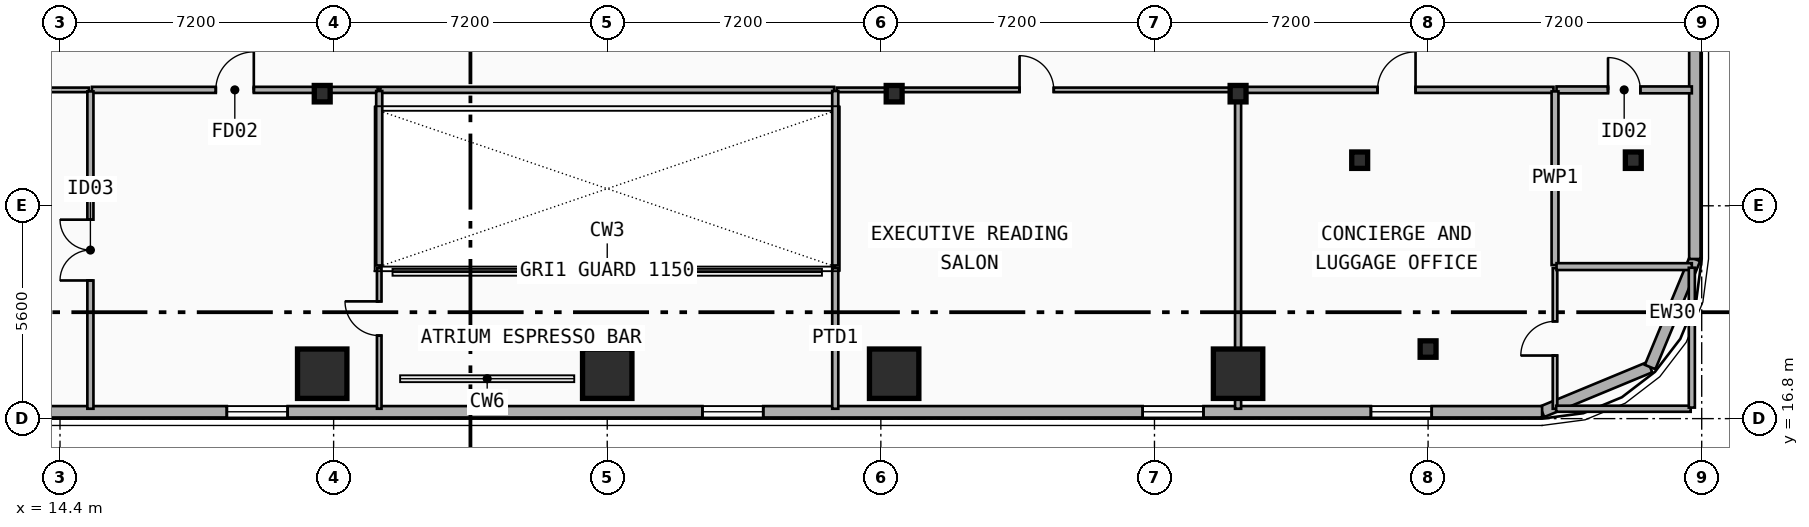
"""IFC4 building model, lengths in metres.
Left out: names, types, materials, properties, quantities, classifications, styles, units other than length and angle.
Written with IfcOpenShell. Run it as: python <this file> out.ifc"""

import sys

from ifc_helpers import new_model, si_unit, direction, frame, frame_2d, origin, origin_2d, place, context, subcontext, project, spatial, rectangle, i_section, extrude, element, fill, save


model = new_model("IFC4")
c1 = context("Model", 3, precision=1e-05, world=origin(), true_north=direction((0.0, 1.0)))
c2 = subcontext(c1, "Body", "Model", "MODEL_VIEW")
j1 = project(units=[si_unit("LENGTHUNIT", "METRE"), si_unit("PLANEANGLEUNIT", "RADIAN")], contexts=[c1])
p1 = place(None, origin())
s1 = spatial("IfcSite", under=j1, at=p1, CompositionType="ELEMENT")
p2 = place(p1, origin())
s2 = spatial("IfcBuilding", under=s1, at=p2, CompositionType="ELEMENT")
p3 = place(p2, frame((0.0, 0.0, 89.8)))
s3 = spatial("IfcBuildingStorey", under=s2, at=p3, CompositionType="ELEMENT", Elevation=89.8)
for number, where, z_axis, x_axis in (
    (1, (21.3, 25.35, 0.0), (0.0, 0.0, 1.0), (1.0, 0.0, 0.0)),
    (2, (36.35, 25.35, 0.0), (0.0, 0.0, 1.0), (1.0, 0.0, 0.0)),
    (3, (45.4, 25.35, 0.0), (0.0, 0.0, 1.0), (1.0, 0.0, 0.0)),
):
    element("IfcColumn", number, at=place(p3, frame(where, z_axis=z_axis, x_axis=x_axis)), inside=s3, PredefinedType="COLUMN", context=c2, shape_type="SweptSolid", body=[
        extrude(i_section(OverallWidth=0.418, OverallDepth=0.432, WebThickness=0.035, FlangeThickness=0.056, FilletRadius=0.015, at=origin_2d()), origin(), (0.0, 0.0, 1.0), 4.5),
    ])
for number, where, z_axis, x_axis in (
    (4, (21.3, 18.09, 0.0), (0.0, -0.09, 0.996), (1.0, 0.0, 0.0)),
    (5, (28.8, 18.09, 0.0), (0.0, -0.09, 0.996), (1.0, 0.0, 0.0)),
    (6, (36.35, 18.09, 0.0), (0.0, -0.09, 0.996), (1.0, 0.0, 0.0)),
    (7, (45.4, 18.09, 0.0), (0.0, -0.09, 0.996), (1.0, 0.0, 0.0)),
):
    element("IfcColumn", number, at=place(p3, frame(where, z_axis=z_axis, x_axis=x_axis)), inside=s3, PredefinedType="COLUMN", context=c2, shape_type="SweptSolid", body=[
        extrude(rectangle(XDim=1.3, YDim=1.3, at=origin_2d()), origin(), (0.0, 0.0, 1.0), 4.518),
    ])
p4 = place(p3, frame((48.6, 23.6, 0.0), z_axis=(0.0, 0.0, 1.0), x_axis=(1.0, 0.0, 0.0)))
e8 = element("IfcColumn", 8, at=p4, inside=s3, PredefinedType="COLUMN", context=c2, shape_type="SweptSolid", body=[
    extrude(i_section(OverallWidth=0.418, OverallDepth=0.432, WebThickness=0.035, FlangeThickness=0.056, FilletRadius=0.015, at=origin_2d()), origin(), (0.0, 0.0, 1.0), 4.5),
])
p5 = place(p3, frame((50.4, 18.727, 0.0), z_axis=(0.0, -0.079876337942, 0.996804780605), x_axis=(1.0, 0.0, 0.0)))
e9 = element("IfcColumn", 9, at=p5, inside=s3, PredefinedType="COLUMN", context=c2, shape_type="SweptSolid", body=[
    extrude(i_section(OverallWidth=0.418, OverallDepth=0.432, WebThickness=0.035, FlangeThickness=0.056, FilletRadius=0.015, at=origin_2d()), origin(), (0.0, 0.0, 1.0), 4.514),
])
p6 = place(p3, frame((55.8, 23.6, 0.0), z_axis=(0.0, 0.0, 1.0), x_axis=(1.0, 0.0, 0.0)))
e10 = element("IfcColumn", 10, at=p6, inside=s3, PredefinedType="COLUMN", context=c2, shape_type="SweptSolid", body=[
    extrude(i_section(OverallWidth=0.418, OverallDepth=0.432, WebThickness=0.035, FlangeThickness=0.056, FilletRadius=0.015, at=origin_2d()), origin(), (0.0, 0.0, 1.0), 4.5),
])
p7 = place(p3, frame((56.243, 18.157, 0.0), z_axis=(0.0, 0.0, 1.0), x_axis=(-0.923882414032, -0.382676475685, 0.0)))
e11 = element("IfcWall", 11, at=p7, inside=s3, PredefinedType="SOLIDWALL", context=c2, shape_type="SweptSolid", body=[
    extrude(rectangle(XDim=3.077, YDim=0.3, at=frame_2d((1.539, 0.0))), origin(), (0.0, 0.0, 1.0), 4.24),
])
p8 = place(p3, frame((57.42, 21.0, 0.0), z_axis=(0.0, 0.0, 1.0), x_axis=(-0.382636798336, -0.92389884758, 0.0)))
e12 = element("IfcWall", 12, at=p8, inside=s3, PredefinedType="SOLIDWALL", context=c2, shape_type="SweptSolid", body=[
    extrude(rectangle(XDim=3.077, YDim=0.3, at=frame_2d((1.538, 0.0))), origin(), (0.0, 0.0, 1.0), 4.24),
])
p9 = place(p3, frame((57.42, 39.0, 0.0), z_axis=(0.0, 0.0, 1.0), x_axis=(0.0, -1.0, 0.0)))
e13 = element("IfcWall", 13, at=p9, inside=s3, PredefinedType="SOLIDWALL", context=c2, shape_type="SweptSolid", body=[
    extrude(rectangle(XDim=18.0, YDim=0.3, at=frame_2d((9.0, 0.0))), origin(), (0.0, 0.0, 1.0), 4.24),
])
p10 = place(p9, frame((2.98, 0.0, 0.85)))
e14 = element("IfcOpeningElement", 14, at=p10, cuts=e13, PredefinedType="OPENING", context=c2, shape_type="SweptSolid", body=[
    extrude(rectangle(XDim=1.4, YDim=1.8, at=frame_2d((0.7, 0.9))), frame((0.0, 0.16, 0.0), z_axis=(0.0, -1.0, 0.0), x_axis=(1.0, 0.0, 0.0)), (0.0, 0.0, 1.0), 0.32),
])
p11 = place(p9, frame((7.04, 0.0, 0.85)))
e15 = element("IfcOpeningElement", 15, at=p11, cuts=e13, PredefinedType="OPENING", context=c2, shape_type="SweptSolid", body=[
    extrude(rectangle(XDim=1.4, YDim=1.8, at=frame_2d((0.7, 0.9))), frame((0.0, 0.16, 0.0), z_axis=(0.0, -1.0, 0.0), x_axis=(1.0, 0.0, 0.0)), (0.0, 0.0, 1.0), 0.32),
])
p12 = place(p3, frame((53.4, 16.98, 0.0), z_axis=(0.0, 0.0, 1.0), x_axis=(-1.0, 0.0, 0.0)))
e16 = element("IfcWall", 16, at=p12, inside=s3, PredefinedType="SOLIDWALL", context=c2, shape_type="SweptSolid", body=[
    extrude(rectangle(XDim=49.2, YDim=0.3, at=frame_2d((24.6, 0.0))), origin(), (0.0, 0.0, 1.0), 4.24),
])
p13 = place(p12, frame((44.695, 0.0, 0.8)))
e17 = element("IfcOpeningElement", 17, at=p13, cuts=e16, PredefinedType="OPENING", context=c2, shape_type="SweptSolid", body=[
    extrude(rectangle(XDim=1.6, YDim=1.95, at=frame_2d((0.8, 0.975))), frame((0.0, 0.16, 0.0), z_axis=(0.0, -1.0, 0.0), x_axis=(1.0, 0.0, 0.0)), (0.0, 0.0, 1.0), 0.32),
])
p14 = place(p12, frame((33.01, 0.0, 0.65)))
e18 = element("IfcOpeningElement", 18, at=p14, cuts=e16, PredefinedType="OPENING", context=c2, shape_type="SweptSolid", body=[
    extrude(rectangle(XDim=1.6, YDim=1.95, at=frame_2d((0.8, 0.975))), frame((0.0, 0.16, 0.0), z_axis=(0.0, -1.0, 0.0), x_axis=(1.0, 0.0, 0.0)), (0.0, 0.0, 1.0), 0.32),
])
p15 = place(p12, frame((20.495, 0.0, 0.8)))
e19 = element("IfcOpeningElement", 19, at=p15, cuts=e16, PredefinedType="OPENING", context=c2, shape_type="SweptSolid", body=[
    extrude(rectangle(XDim=1.6, YDim=1.95, at=frame_2d((0.8, 0.975))), frame((0.0, 0.16, 0.0), z_axis=(0.0, -1.0, 0.0), x_axis=(1.0, 0.0, 0.0)), (0.0, 0.0, 1.0), 0.32),
])
p16 = place(p12, frame((8.91, 0.0, 0.65)))
e20 = element("IfcOpeningElement", 20, at=p16, cuts=e16, PredefinedType="OPENING", context=c2, shape_type="SweptSolid", body=[
    extrude(rectangle(XDim=1.6, YDim=1.95, at=frame_2d((0.8, 0.975))), frame((0.0, 0.16, 0.0), z_axis=(0.0, -1.0, 0.0), x_axis=(1.0, 0.0, 0.0)), (0.0, 0.0, 1.0), 0.32),
])
p17 = place(p12, frame((2.905, 0.0, 0.8)))
e21 = element("IfcOpeningElement", 21, at=p17, cuts=e16, PredefinedType="OPENING", context=c2, shape_type="SweptSolid", body=[
    extrude(rectangle(XDim=1.6, YDim=1.95, at=frame_2d((0.8, 0.975))), frame((0.0, 0.16, 0.0), z_axis=(0.0, -1.0, 0.0), x_axis=(1.0, 0.0, 0.0)), (0.0, 0.0, 1.0), 0.32),
])
p18 = place(p3, frame((0.26, 25.45, 0.0), z_axis=(0.0, 0.0, 1.0), x_axis=(1.0, 0.0, 0.0)))
e22 = element("IfcWall", 22, at=p18, inside=s3, PredefinedType="PARTITIONING", context=c2, shape_type="SweptSolid", body=[
    extrude(rectangle(XDim=14.9, YDim=0.12, at=frame_2d((7.45, 0.0))), origin(), (0.0, 0.0, 1.0), 3.31),
])
p19 = place(p18, frame((7.0, 0.0, 0.0)))
e23 = element("IfcOpeningElement", 23, at=p19, cuts=e22, PredefinedType="OPENING", context=c2, shape_type="SweptSolid", body=[
    extrude(rectangle(XDim=0.9, YDim=2.1, at=frame_2d((0.45, 1.05))), frame((0.0, 0.07, 0.0), z_axis=(0.0, -1.0, 0.0), x_axis=(1.0, 0.0, 0.0)), (0.0, 0.0, 1.0), 0.14),
])
p20 = place(p3, frame((15.24, 25.45, 0.0), z_axis=(0.0, 0.0, 1.0), x_axis=(1.0, 0.0, 0.0)))
e24 = element("IfcWall", 24, at=p20, inside=s3, PredefinedType="PARTITIONING", context=c2, shape_type="SweptSolid", body=[
    extrude(rectangle(XDim=7.52, YDim=0.16, at=frame_2d((3.76, 0.0))), origin(), (0.0, 0.0, 1.0), 3.31),
])
p21 = place(p20, frame((3.26, 0.0, 0.0)))
e25 = element("IfcOpeningElement", 25, at=p21, cuts=e24, PredefinedType="OPENING", context=c2, shape_type="SweptSolid", body=[
    extrude(rectangle(XDim=1.0, YDim=2.15, at=frame_2d((0.5, 1.075))), frame((0.0, 0.09, 0.0), z_axis=(0.0, -1.0, 0.0), x_axis=(1.0, 0.0, 0.0)), (0.0, 0.0, 1.0), 0.18),
])
p22 = place(p3, frame((34.84, 25.45, 0.0), z_axis=(0.0, 0.0, 1.0), x_axis=(1.0, 0.0, 0.0)))
e26 = element("IfcWall", 26, at=p22, inside=s3, PredefinedType="PARTITIONING", context=c2, shape_type="SweptSolid", body=[
    extrude(rectangle(XDim=10.52, YDim=0.12, at=frame_2d((5.26, 0.0))), origin(), (0.0, 0.0, 1.0), 3.31),
])
p23 = place(p22, frame((4.81, 0.0, 0.0)))
e27 = element("IfcOpeningElement", 27, at=p23, cuts=e26, PredefinedType="OPENING", context=c2, shape_type="SweptSolid", body=[
    extrude(rectangle(XDim=0.9, YDim=2.1, at=frame_2d((0.45, 1.05))), frame((0.0, 0.07, 0.0), z_axis=(0.0, -1.0, 0.0), x_axis=(1.0, 0.0, 0.0)), (0.0, 0.0, 1.0), 0.14),
])
p24 = place(p3, frame((45.44, 25.45, 0.0), z_axis=(0.0, 0.0, 1.0), x_axis=(1.0, 0.0, 0.0)))
e28 = element("IfcWall", 28, at=p24, inside=s3, PredefinedType="PARTITIONING", context=c2, shape_type="SweptSolid", body=[
    extrude(rectangle(XDim=8.26, YDim=0.16, at=frame_2d((4.13, 0.0))), origin(), (0.0, 0.0, 1.0), 3.31),
])
p25 = place(p24, frame((3.63, 0.0, 0.0)))
e29 = element("IfcOpeningElement", 29, at=p25, cuts=e28, PredefinedType="OPENING", context=c2, shape_type="SweptSolid", body=[
    extrude(rectangle(XDim=1.0, YDim=2.15, at=frame_2d((0.5, 1.075))), frame((0.0, 0.09, 0.0), z_axis=(0.0, -1.0, 0.0), x_axis=(1.0, 0.0, 0.0)), (0.0, 0.0, 1.0), 0.18),
])
p26 = place(p3, frame((53.78, 25.45, 0.0), z_axis=(0.0, 0.0, 1.0), x_axis=(1.0, 0.0, 0.0)))
e30 = element("IfcWall", 30, at=p26, inside=s3, PredefinedType="PLUMBINGWALL", context=c2, shape_type="SweptSolid", body=[
    extrude(rectangle(XDim=3.56, YDim=0.18, at=frame_2d((1.78, 0.0))), origin(), (0.0, 0.0, 1.0), 3.57),
])
p27 = place(p26, frame((1.355, 0.0, 0.0)))
e31 = element("IfcOpeningElement", 31, at=p27, cuts=e30, PredefinedType="OPENING", context=c2, shape_type="SweptSolid", body=[
    extrude(rectangle(XDim=0.85, YDim=2.1, at=frame_2d((0.425, 1.05))), frame((0.0, 0.1, 0.0), z_axis=(0.0, -1.0, 0.0), x_axis=(1.0, 0.0, 0.0)), (0.0, 0.0, 1.0), 0.2),
])
p28 = place(p3, frame((15.2, 17.06, 0.0), z_axis=(0.0, 0.0, 1.0), x_axis=(0.0, 1.0, 0.0)))
e32 = element("IfcWall", 32, at=p28, inside=s3, PredefinedType="PARTITIONING", context=c2, shape_type="SweptSolid", body=[
    extrude(rectangle(XDim=8.35, YDim=0.16, at=frame_2d((4.175, 0.0))), origin(), (0.0, 0.0, 1.0), 3.72),
])
p29 = place(p28, frame((3.375, 0.0, 0.0)))
e33 = element("IfcOpeningElement", 33, at=p29, cuts=e32, PredefinedType="OPENING", context=c2, shape_type="SweptSolid", body=[
    extrude(rectangle(XDim=1.6, YDim=2.2, at=frame_2d((0.8, 1.1))), frame((0.0, 0.09, 0.0), z_axis=(0.0, -1.0, 0.0), x_axis=(1.0, 0.0, 0.0)), (0.0, 0.0, 1.0), 0.18),
])
p30 = place(p3, frame((22.8, 17.06, 0.0), z_axis=(0.0, 0.0, 1.0), x_axis=(0.0, 1.0, 0.0)))
e34 = element("IfcWall", 34, at=p30, inside=s3, PredefinedType="PARTITIONING", context=c2, shape_type="SweptSolid", body=[
    extrude(rectangle(XDim=3.7, YDim=0.12, at=frame_2d((1.85, 0.0))), origin(), (0.0, 0.0, 1.0), 3.68),
])
p31 = place(p30, frame((1.925, 0.0, 0.0)))
e35 = element("IfcOpeningElement", 35, at=p31, cuts=e34, PredefinedType="OPENING", context=c2, shape_type="SweptSolid", body=[
    extrude(rectangle(XDim=0.9, YDim=2.1, at=frame_2d((0.45, 1.05))), frame((0.0, 0.07, 0.0), z_axis=(0.0, -1.0, 0.0), x_axis=(1.0, 0.0, 0.0)), (0.0, 0.0, 1.0), 0.14),
])
p32 = place(p3, frame((34.8, 17.06, 0.0), z_axis=(0.0, 0.0, 1.0), x_axis=(0.0, 1.0, 0.0)))
e36 = element("IfcWall", 36, at=p32, inside=s3, PredefinedType="PARTITIONING", context=c2, shape_type="SweptSolid", body=[
    extrude(rectangle(XDim=3.7, YDim=0.16, at=frame_2d((1.85, 0.0))), origin(), (0.0, 0.0, 1.0), 3.68),
])
p33 = place(p3, frame((45.4, 17.06, 0.0), z_axis=(0.0, 0.0, 1.0), x_axis=(0.0, 1.0, 0.0)))
e37 = element("IfcWall", 37, at=p33, inside=s3, PredefinedType="PARTITIONING", context=c2, shape_type="SweptSolid", body=[
    extrude(rectangle(XDim=8.35, YDim=0.16, at=frame_2d((4.175, 0.0))), origin(), (0.0, 0.0, 1.0), 3.31),
])
p34 = place(p3, frame((53.74, 17.06, 0.0), z_axis=(0.0, 0.0, 1.0), x_axis=(0.0, 1.0, 0.0)))
e38 = element("IfcWall", 38, at=p34, inside=s3, PredefinedType="PARTITIONING", context=c2, shape_type="SweptSolid", body=[
    extrude(rectangle(XDim=3.7, YDim=0.12, at=frame_2d((1.85, 0.0))), origin(), (0.0, 0.0, 1.0), 3.72),
])
p35 = place(p34, frame((1.4, 0.0, 0.0)))
e39 = element("IfcOpeningElement", 39, at=p35, cuts=e38, PredefinedType="OPENING", context=c2, shape_type="SweptSolid", body=[
    extrude(rectangle(XDim=0.9, YDim=2.1, at=frame_2d((0.45, 1.05))), frame((0.0, 0.07, 0.0), z_axis=(0.0, -1.0, 0.0), x_axis=(1.0, 0.0, 0.0)), (0.0, 0.0, 1.0), 0.14),
])
p36 = place(p3, frame((53.74, 20.84, 0.0), z_axis=(0.0, 0.0, 1.0), x_axis=(0.0, 1.0, 0.0)))
e40 = element("IfcWall", 40, at=p36, inside=s3, PredefinedType="PLUMBINGWALL", context=c2, shape_type="SweptSolid", body=[
    extrude(rectangle(XDim=4.57, YDim=0.18, at=frame_2d((2.285, 0.0))), origin(), (0.0, 0.0, 1.0), 3.72),
])
p37 = place(p3, frame((53.78, 20.8, 0.0), z_axis=(0.0, 0.0, 1.0), x_axis=(1.0, 0.0, 0.0)))
e41 = element("IfcWall", 41, at=p37, inside=s3, PredefinedType="PLUMBINGWALL", context=c2, shape_type="SweptSolid", body=[
    extrude(rectangle(XDim=3.56, YDim=0.18, at=frame_2d((1.78, 0.0))), origin(), (0.0, 0.0, 1.0), 3.72),
])
p38 = place(p3, frame((22.83, 25.45, 0.0), z_axis=(0.0, 0.0, 1.0), x_axis=(1.0, 0.0, 0.0)))
e42 = element("IfcWall", 42, at=p38, inside=s3, PredefinedType="PARTITIONING", context=c2, shape_type="SweptSolid", body=[
    extrude(rectangle(XDim=11.94, YDim=0.16, at=frame_2d((5.97, 0.0))), origin(), (0.0, 0.0, 1.0), 4.24),
])
for number, where, z_axis, x_axis in (
    (43, (22.8, 20.83, 0.0), (0.0, 0.0, 1.0), (0.0, 1.0, 0.0)),
    (44, (34.8, 20.83, 0.0), (0.0, 0.0, 1.0), (0.0, 1.0, 0.0)),
):
    element("IfcWall", number, at=place(p3, frame(where, z_axis=z_axis, x_axis=x_axis)), inside=s3, PredefinedType="PARTITIONING", context=c2, shape_type="SweptSolid", body=[
        extrude(rectangle(XDim=4.59, YDim=0.16, at=frame_2d((2.295, 0.0))), origin(), (0.0, 0.0, 1.0), 3.68),
    ])
p39 = place(p3, frame((53.77, 17.06, 0.0), z_axis=(0.0, 0.0, 1.0), x_axis=(1.0, 0.0, 0.0)))
e45 = element("IfcWall", 45, at=p39, inside=s3, PredefinedType="PARTITIONING", context=c2, shape_type="SweptSolid", body=[
    extrude(rectangle(XDim=3.54, YDim=0.16, at=frame_2d((1.77, 0.0))), origin(), (0.0, 0.0, 1.0), 4.24),
])
p40 = place(p3, frame((57.34, 17.09, 0.0), z_axis=(0.0, 0.0, 1.0), x_axis=(0.0, 1.0, 0.0)))
e46 = element("IfcWall", 46, at=p40, inside=s3, PredefinedType="PARTITIONING", context=c2, shape_type="SweptSolid", body=[
    extrude(rectangle(XDim=3.68, YDim=0.16, at=frame_2d((1.84, 0.0))), origin(), (0.0, 0.0, 1.0), 4.24),
])
p41 = place(p14, origin())
e47 = element("IfcWindow", 47, at=p41, inside=s3, PartitioningType="SINGLE_PANEL", PredefinedType="WINDOW", context=c2, shape_type="SweptSolid", body=[
    extrude(rectangle(XDim=1.6, YDim=1.95, at=frame_2d((0.8, 0.975))), frame((0.0, 0.03, 0.0), z_axis=(0.0, -1.0, 0.0), x_axis=(1.0, 0.0, 0.0)), (0.0, 0.0, 1.0), 0.06),
])
fill(e18, e47)
p42 = place(p15, origin())
e48 = element("IfcWindow", 48, at=p42, inside=s3, PartitioningType="SINGLE_PANEL", PredefinedType="WINDOW", context=c2, shape_type="SweptSolid", body=[
    extrude(rectangle(XDim=1.6, YDim=1.95, at=frame_2d((0.8, 0.975))), frame((0.0, 0.03, 0.0), z_axis=(0.0, -1.0, 0.0), x_axis=(1.0, 0.0, 0.0)), (0.0, 0.0, 1.0), 0.06),
])
fill(e19, e48)
p43 = place(p16, origin())
e49 = element("IfcWindow", 49, at=p43, inside=s3, PartitioningType="SINGLE_PANEL", PredefinedType="WINDOW", context=c2, shape_type="SweptSolid", body=[
    extrude(rectangle(XDim=1.6, YDim=1.95, at=frame_2d((0.8, 0.975))), frame((0.0, 0.03, 0.0), z_axis=(0.0, -1.0, 0.0), x_axis=(1.0, 0.0, 0.0)), (0.0, 0.0, 1.0), 0.06),
])
fill(e20, e49)
p44 = place(p17, origin())
e50 = element("IfcWindow", 50, at=p44, inside=s3, PartitioningType="SINGLE_PANEL", PredefinedType="WINDOW", context=c2, shape_type="SweptSolid", body=[
    extrude(rectangle(XDim=1.6, YDim=1.95, at=frame_2d((0.8, 0.975))), frame((0.0, 0.03, 0.0), z_axis=(0.0, -1.0, 0.0), x_axis=(1.0, 0.0, 0.0)), (0.0, 0.0, 1.0), 0.06),
])
fill(e21, e50)
p45 = place(p21, origin())
e51 = element("IfcDoor", 51, at=p45, inside=s3, OperationType="SINGLE_SWING_RIGHT", PredefinedType="DOOR", context=c2, shape_type="SweptSolid", body=[
    extrude(rectangle(XDim=1.0, YDim=2.15, at=frame_2d((0.5, 1.075))), frame((0.0, 0.025, 0.0), z_axis=(0.0, -1.0, 0.0), x_axis=(1.0, 0.0, 0.0)), (0.0, 0.0, 1.0), 0.05),
])
fill(e25, e51)
p46 = place(p23, origin())
e52 = element("IfcDoor", 52, at=p46, inside=s3, OperationType="SINGLE_SWING_LEFT", PredefinedType="DOOR", context=c2, shape_type="SweptSolid", body=[
    extrude(rectangle(XDim=0.9, YDim=2.1, at=frame_2d((0.45, 1.05))), frame((0.0, 0.025, 0.0), z_axis=(0.0, -1.0, 0.0), x_axis=(1.0, 0.0, 0.0)), (0.0, 0.0, 1.0), 0.05),
])
fill(e27, e52)
p47 = place(p25, origin())
e53 = element("IfcDoor", 53, at=p47, inside=s3, OperationType="SINGLE_SWING_RIGHT", PredefinedType="DOOR", context=c2, shape_type="SweptSolid", body=[
    extrude(rectangle(XDim=1.0, YDim=2.15, at=frame_2d((0.5, 1.075))), frame((0.0, 0.025, 0.0), z_axis=(0.0, -1.0, 0.0), x_axis=(1.0, 0.0, 0.0)), (0.0, 0.0, 1.0), 0.05),
])
fill(e29, e53)
p48 = place(p27, origin())
e54 = element("IfcDoor", 54, at=p48, inside=s3, OperationType="SINGLE_SWING_LEFT", PredefinedType="DOOR", context=c2, shape_type="SweptSolid", body=[
    extrude(rectangle(XDim=0.85, YDim=2.1, at=frame_2d((0.425, 1.05))), frame((0.0, 0.025, 0.0), z_axis=(0.0, -1.0, 0.0), x_axis=(1.0, 0.0, 0.0)), (0.0, 0.0, 1.0), 0.05),
])
fill(e31, e54)
p49 = place(p29, origin())
e55 = element("IfcDoor", 55, at=p49, inside=s3, OperationType="SINGLE_SWING_LEFT", PredefinedType="DOOR", context=c2, shape_type="SweptSolid", body=[
    extrude(rectangle(XDim=1.6, YDim=2.2, at=frame_2d((0.8, 1.1))), frame((0.0, 0.025, 0.0), z_axis=(0.0, -1.0, 0.0), x_axis=(1.0, 0.0, 0.0)), (0.0, 0.0, 1.0), 0.05),
])
fill(e33, e55)
p50 = place(p31, origin())
e56 = element("IfcDoor", 56, at=p50, inside=s3, OperationType="SINGLE_SWING_RIGHT", PredefinedType="DOOR", context=c2, shape_type="SweptSolid", body=[
    extrude(rectangle(XDim=0.9, YDim=2.1, at=frame_2d((0.45, 1.05))), frame((0.0, 0.025, 0.0), z_axis=(0.0, -1.0, 0.0), x_axis=(1.0, 0.0, 0.0)), (0.0, 0.0, 1.0), 0.05),
])
fill(e35, e56)
p51 = place(p35, origin())
e57 = element("IfcDoor", 57, at=p51, inside=s3, OperationType="SINGLE_SWING_LEFT", PredefinedType="DOOR", context=c2, shape_type="SweptSolid", body=[
    extrude(rectangle(XDim=0.9, YDim=2.1, at=frame_2d((0.45, 1.05))), frame((0.0, 0.025, 0.0), z_axis=(0.0, -1.0, 0.0), x_axis=(1.0, 0.0, 0.0)), (0.0, 0.0, 1.0), 0.05),
])
fill(e39, e57)
save(model, sys.argv[1])
